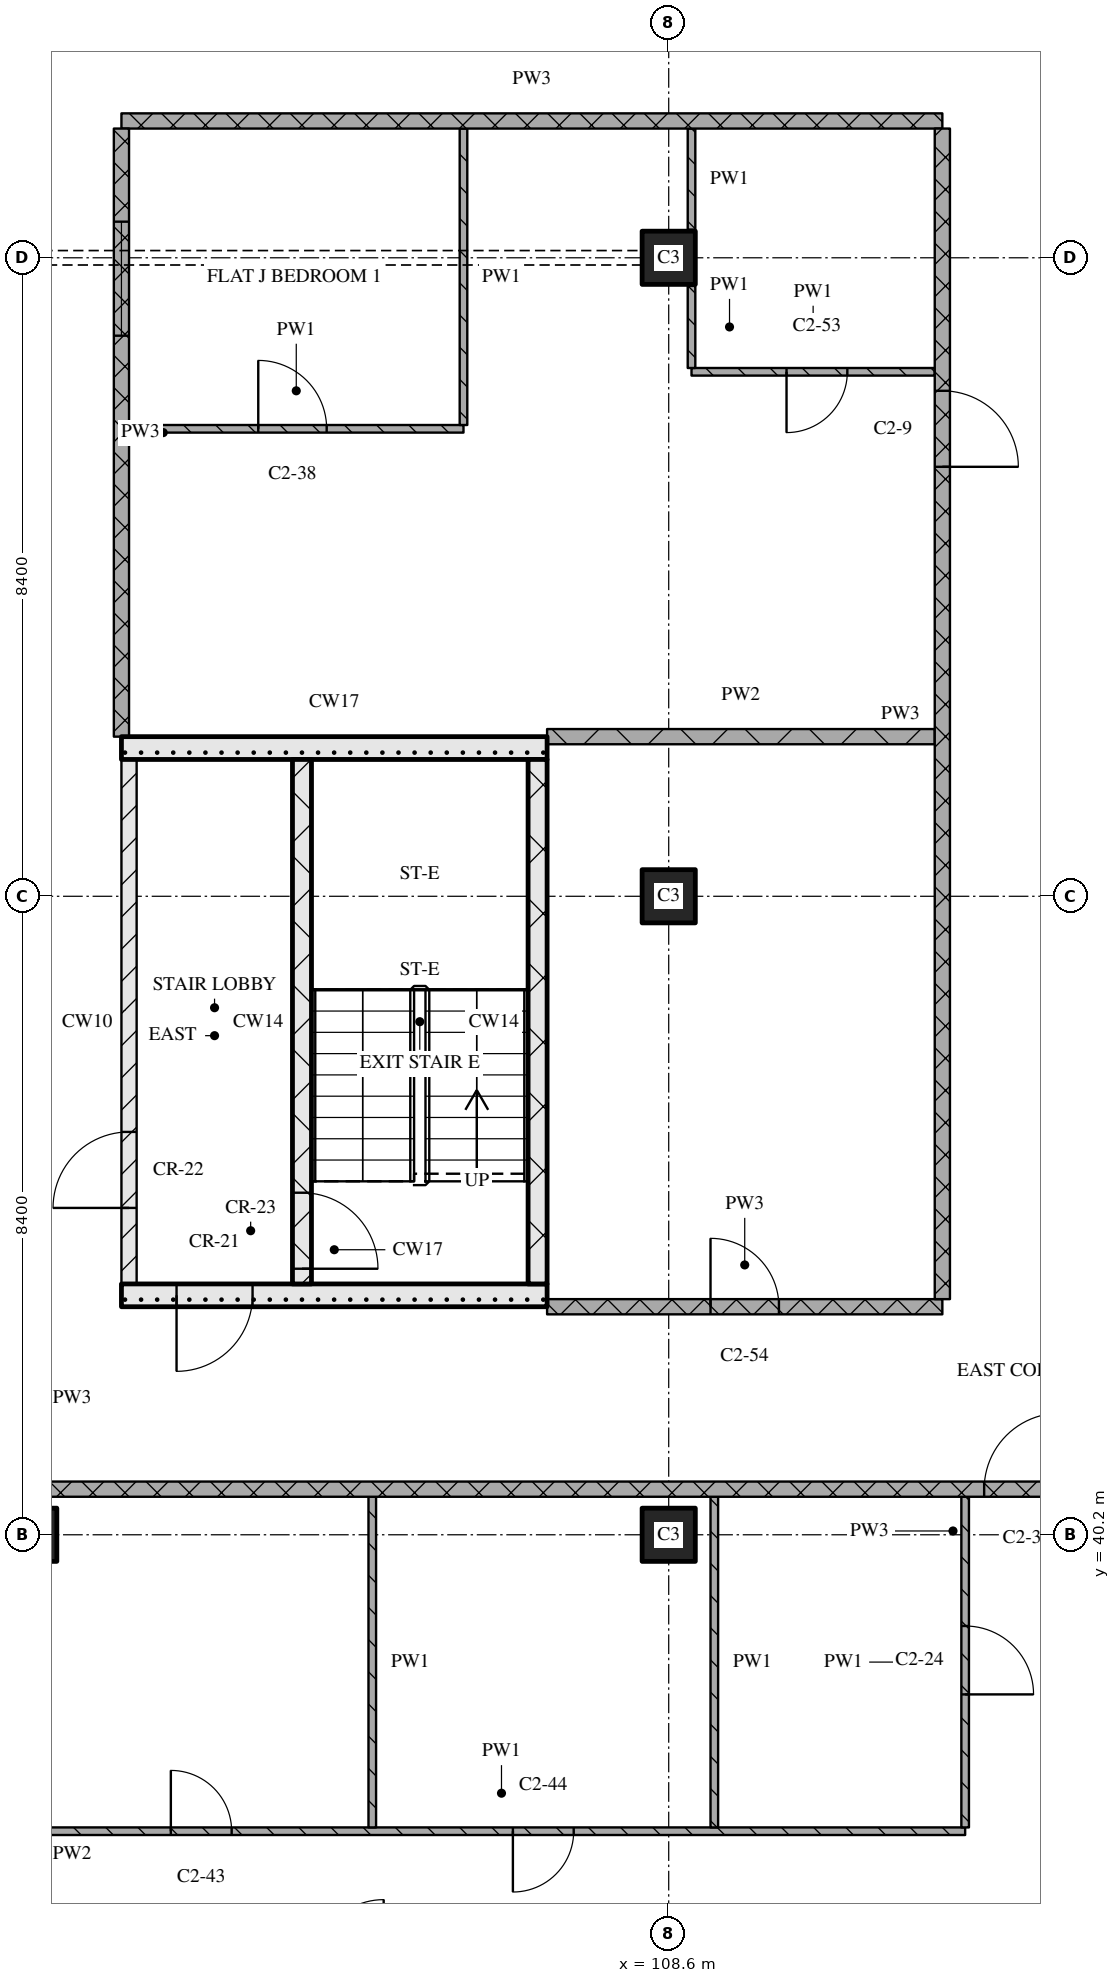
"""IFC4 building model, lengths in metres.
Left out: names, types, materials, properties, quantities, classifications, styles, units other than length and angle.
Written with IfcOpenShell. Run it as: python <this file> out.ifc"""

import sys

from ifc_helpers import new_model, si_unit, direction, frame, frame_2d, origin, origin_2d, place, context, subcontext, project, spatial, rectangle, extrude, element, fill, save


model = new_model("IFC4")
c1 = context("Model", 3, precision=1e-05, world=origin(), true_north=direction((0.0, 1.0)))
c2 = subcontext(c1, "Body", "Model", "MODEL_VIEW")
j1 = project(units=[si_unit("LENGTHUNIT", "METRE"), si_unit("PLANEANGLEUNIT", "RADIAN")], contexts=[c1])
p1 = place(None, origin())
s1 = spatial("IfcSite", under=j1, at=p1, CompositionType="ELEMENT")
p2 = place(p1, origin())
s2 = spatial("IfcBuilding", under=s1, at=p2, CompositionType="ELEMENT")
p3 = place(p2, frame((0.0, 0.0, 161.85)))
s3 = spatial("IfcBuildingStorey", under=s2, at=p3, CompositionType="ELEMENT", Elevation=161.85)
for number, where, z_axis, x_axis in (
    (1, (100.2, 40.2, 0.0), (0.0, 0.0, 1.0), (1.0, 0.0, 0.0)),
    (2, (108.6, 40.2, 0.0), (0.0, 0.0, 1.0), (1.0, 0.0, 0.0)),
    (3, (108.6, 48.6, 0.0), (0.0, 0.0, 1.0), (1.0, 0.0, 0.0)),
    (4, (108.6, 57.0, 0.0), (0.0, 0.0, 1.0), (1.0, 0.0, 0.0)),
):
    element("IfcColumn", number, at=place(p3, frame(where, z_axis=z_axis, x_axis=x_axis)), inside=s3, PredefinedType="COLUMN", context=c2, shape_type="SweptSolid", body=[
        extrude(rectangle(XDim=0.7, YDim=0.7, at=origin_2d()), origin(), (0.0, 0.0, 1.0), 3.6),
    ])
p4 = place(p3, frame((101.4, 43.35, 0.0), z_axis=(0.0, 0.0, 1.0), x_axis=(1.0, 0.0, 0.0)))
e5 = element("IfcWall", 5, at=p4, inside=s3, PredefinedType="SOLIDWALL", context=c2, shape_type="SweptSolid", body=[
    extrude(rectangle(XDim=5.6, YDim=0.3, at=frame_2d((2.8, 0.0))), origin(), (0.0, 0.0, 1.0), 3.32),
])
p5 = place(p4, frame((0.725, 0.0, 0.0)))
e6 = element("IfcOpeningElement", 6, at=p5, cuts=e5, PredefinedType="OPENING", context=c2, shape_type="SweptSolid", body=[
    extrude(rectangle(XDim=1.0, YDim=2.1, at=frame_2d((0.5, 1.05))), frame((0.0, 0.16, 0.0), z_axis=(0.0, -1.0, 0.0), x_axis=(1.0, 0.0, 0.0)), (0.0, 0.0, 1.0), 0.32),
])
p6 = place(p3, frame((101.5, 43.5, 0.0), z_axis=(0.0, 0.0, 1.0), x_axis=(0.0, 1.0, 0.0)))
e7 = element("IfcWall", 7, at=p6, inside=s3, PredefinedType="PARTITIONING", context=c2, shape_type="SweptSolid", body=[
    extrude(rectangle(XDim=6.9, YDim=0.2, at=frame_2d((3.45, 0.0))), origin(), (0.0, 0.0, 1.0), 3.32),
])
p7 = place(p6, frame((1.0, 0.0, 0.0)))
e8 = element("IfcOpeningElement", 8, at=p7, cuts=e7, PredefinedType="OPENING", context=c2, shape_type="SweptSolid", body=[
    extrude(rectangle(XDim=1.0, YDim=2.1, at=frame_2d((0.5, 1.05))), frame((0.0, 0.11, 0.0), z_axis=(0.0, -1.0, 0.0), x_axis=(1.0, 0.0, 0.0)), (0.0, 0.0, 1.0), 0.22),
])
p8 = place(p3, frame((103.775, 43.5, 0.0), z_axis=(0.0, 0.0, 1.0), x_axis=(0.0, 1.0, 0.0)))
e9 = element("IfcWall", 9, at=p8, inside=s3, PredefinedType="SOLIDWALL", context=c2, shape_type="SweptSolid", body=[
    extrude(rectangle(XDim=6.9, YDim=0.25, at=frame_2d((3.45, 0.0))), origin(), (0.0, 0.0, 1.0), 3.32),
])
p9 = place(p8, frame((0.2, 0.0, 0.0)))
e10 = element("IfcOpeningElement", 10, at=p9, cuts=e9, PredefinedType="OPENING", context=c2, shape_type="SweptSolid", body=[
    extrude(rectangle(XDim=1.0, YDim=2.1, at=frame_2d((0.5, 1.05))), frame((0.0, 0.135, 0.0), z_axis=(0.0, -1.0, 0.0), x_axis=(1.0, 0.0, 0.0)), (0.0, 0.0, 1.0), 0.27),
])
p10 = place(p3, frame((106.875, 43.5, 0.0), z_axis=(0.0, 0.0, 1.0), x_axis=(0.0, 1.0, 0.0)))
e11 = element("IfcWall", 11, at=p10, inside=s3, PredefinedType="SOLIDWALL", context=c2, shape_type="SweptSolid", body=[
    extrude(rectangle(XDim=6.9, YDim=0.25, at=frame_2d((3.45, 0.0))), origin(), (0.0, 0.0, 1.0), 3.32),
])
p11 = place(p3, frame((101.4, 50.55, 0.0), z_axis=(0.0, 0.0, 1.0), x_axis=(1.0, 0.0, 0.0)))
e12 = element("IfcWall", 12, at=p11, inside=s3, PredefinedType="SOLIDWALL", context=c2, shape_type="SweptSolid", body=[
    extrude(rectangle(XDim=5.6, YDim=0.3, at=frame_2d((2.8, 0.0))), origin(), (0.0, 0.0, 1.0), 3.32),
])
p12 = place(p3, frame((100.3, 36.3, 0.0), z_axis=(0.0, 0.0, 1.0), x_axis=(1.0, 0.0, 0.0)))
e13 = element("IfcWall", 13, at=p12, inside=s3, PredefinedType="PARTITIONING", context=c2, shape_type="SweptSolid", body=[
    extrude(rectangle(XDim=12.2, YDim=0.1, at=frame_2d((6.1, 0.0))), origin(), (0.0, 0.0, 1.0), 3.32),
])
p13 = place(p12, frame((1.75, 0.0, 0.0)))
e14 = element("IfcOpeningElement", 14, at=p13, cuts=e13, PredefinedType="OPENING", context=c2, shape_type="SweptSolid", body=[
    extrude(rectangle(XDim=0.8, YDim=2.1, at=frame_2d((0.4, 1.05))), frame((0.0, 0.06, 0.0), z_axis=(0.0, -1.0, 0.0), x_axis=(1.0, 0.0, 0.0)), (0.0, 0.0, 1.0), 0.12),
])
p14 = place(p12, frame((6.25, 0.0, 0.0)))
e15 = element("IfcOpeningElement", 15, at=p14, cuts=e13, PredefinedType="OPENING", context=c2, shape_type="SweptSolid", body=[
    extrude(rectangle(XDim=0.8, YDim=2.1, at=frame_2d((0.4, 1.05))), frame((0.0, 0.06, 0.0), z_axis=(0.0, -1.0, 0.0), x_axis=(1.0, 0.0, 0.0)), (0.0, 0.0, 1.0), 0.12),
])
p15 = place(p3, frame((124.48, 40.8, 0.0), z_axis=(0.0, 0.0, 1.0), x_axis=(-1.0, 0.0, 0.0)))
e16 = element("IfcWall", 16, at=p15, inside=s3, PredefinedType="PARTITIONING", context=c2, shape_type="SweptSolid", body=[
    extrude(rectangle(XDim=24.28, YDim=0.2, at=frame_2d((12.14, 0.0))), origin(), (0.0, 0.0, 1.0), 3.32),
])
p16 = place(p15, frame((10.73, 0.0, 0.0)))
e17 = element("IfcOpeningElement", 17, at=p16, cuts=e16, PredefinedType="OPENING", context=c2, shape_type="SweptSolid", body=[
    extrude(rectangle(XDim=1.0, YDim=2.1, at=frame_2d((0.5, 1.05))), frame((0.0, 0.11, 0.0), z_axis=(0.0, -1.0, 0.0), x_axis=(1.0, 0.0, 0.0)), (0.0, 0.0, 1.0), 0.22),
])
p17 = place(p3, frame((107.0, 43.2, 0.0), z_axis=(0.0, 0.0, 1.0), x_axis=(1.0, 0.0, 0.0)))
e18 = element("IfcWall", 18, at=p17, inside=s3, PredefinedType="PARTITIONING", context=c2, shape_type="SweptSolid", body=[
    extrude(rectangle(XDim=5.2, YDim=0.2, at=frame_2d((2.6, 0.0))), origin(), (0.0, 0.0, 1.0), 3.32),
])
p18 = place(p17, frame((2.15, 0.0, 0.0)))
e19 = element("IfcOpeningElement", 19, at=p18, cuts=e18, PredefinedType="OPENING", context=c2, shape_type="SweptSolid", body=[
    extrude(rectangle(XDim=0.9, YDim=2.1, at=frame_2d((0.45, 1.05))), frame((0.0, 0.11, 0.0), z_axis=(0.0, -1.0, 0.0), x_axis=(1.0, 0.0, 0.0)), (0.0, 0.0, 1.0), 0.22),
])
p19 = place(p3, frame((107.0, 50.7, 0.0), z_axis=(0.0, 0.0, 1.0), x_axis=(1.0, 0.0, 0.0)))
e20 = element("IfcWall", 20, at=p19, inside=s3, PredefinedType="PARTITIONING", context=c2, shape_type="SweptSolid", body=[
    extrude(rectangle(XDim=5.1, YDim=0.2, at=frame_2d((2.55, 0.0))), origin(), (0.0, 0.0, 1.0), 3.32),
])
p20 = place(p3, frame((101.5, 54.75, 0.0), z_axis=(0.0, 0.0, 1.0), x_axis=(1.0, 0.0, 0.0)))
e21 = element("IfcWall", 21, at=p20, inside=s3, PredefinedType="PARTITIONING", context=c2, shape_type="SweptSolid", body=[
    extrude(rectangle(XDim=4.4, YDim=0.1, at=frame_2d((2.2, 0.0))), origin(), (0.0, 0.0, 1.0), 3.32),
])
p21 = place(p20, frame((1.7, 0.0, 0.0)))
e22 = element("IfcOpeningElement", 22, at=p21, cuts=e21, PredefinedType="OPENING", context=c2, shape_type="SweptSolid", body=[
    extrude(rectangle(XDim=0.9, YDim=2.1, at=frame_2d((0.45, 1.05))), frame((0.0, 0.06, 0.0), z_axis=(0.0, -1.0, 0.0), x_axis=(1.0, 0.0, 0.0)), (0.0, 0.0, 1.0), 0.12),
])
p22 = place(p3, frame((108.9, 55.5, 0.0), z_axis=(0.0, 0.0, 1.0), x_axis=(1.0, 0.0, 0.0)))
e23 = element("IfcWall", 23, at=p22, inside=s3, PredefinedType="PARTITIONING", context=c2, shape_type="SweptSolid", body=[
    extrude(rectangle(XDim=3.2, YDim=0.1, at=frame_2d((1.6, 0.0))), origin(), (0.0, 0.0, 1.0), 3.32),
])
p23 = place(p22, frame((1.25, 0.0, 0.0)))
e24 = element("IfcOpeningElement", 24, at=p23, cuts=e23, PredefinedType="OPENING", context=c2, shape_type="SweptSolid", body=[
    extrude(rectangle(XDim=0.8, YDim=2.1, at=frame_2d((0.4, 1.05))), frame((0.0, 0.06, 0.0), z_axis=(0.0, -1.0, 0.0), x_axis=(1.0, 0.0, 0.0)), (0.0, 0.0, 1.0), 0.12),
])
p24 = place(p3, frame((101.4, 58.8, 0.0), z_axis=(0.0, 0.0, 1.0), x_axis=(1.0, 0.0, 0.0)))
e25 = element("IfcWall", 25, at=p24, inside=s3, PredefinedType="PARTITIONING", context=c2, shape_type="SweptSolid", body=[
    extrude(rectangle(XDim=10.8, YDim=0.2, at=frame_2d((5.4, 0.0))), origin(), (0.0, 0.0, 1.0), 3.32),
])
p25 = place(p3, frame((101.4, 58.7, 0.0), z_axis=(0.0, 0.0, 1.0), x_axis=(0.0, -1.0, 0.0)))
e26 = element("IfcWall", 26, at=p25, inside=s3, PredefinedType="PARTITIONING", context=c2, shape_type="SweptSolid", body=[
    extrude(rectangle(XDim=8.0, YDim=0.2, at=frame_2d((4.0, 0.0))), origin(), (0.0, 0.0, 1.0), 3.32),
])
p26 = place(p25, frame((1.225, 0.0, 0.9)))
e27 = element("IfcOpeningElement", 27, at=p26, cuts=e26, PredefinedType="OPENING", context=c2, shape_type="SweptSolid", body=[
    extrude(rectangle(XDim=1.5, YDim=1.5, at=frame_2d((0.75, 0.75))), frame((0.0, 0.11, 0.0), z_axis=(0.0, -1.0, 0.0), x_axis=(1.0, 0.0, 0.0)), (0.0, 0.0, 1.0), 0.22),
])
p27 = place(p3, frame((104.7, 40.7, 0.0), z_axis=(0.0, 0.0, 1.0), x_axis=(0.0, -1.0, 0.0)))
e28 = element("IfcWall", 28, at=p27, inside=s3, PredefinedType="PARTITIONING", context=c2, shape_type="SweptSolid", body=[
    extrude(rectangle(XDim=4.35, YDim=0.1, at=frame_2d((2.175, 0.0))), origin(), (0.0, 0.0, 1.0), 3.32),
])
p28 = place(p3, frame((105.9, 58.7, 0.0), z_axis=(0.0, 0.0, 1.0), x_axis=(0.0, -1.0, 0.0)))
e29 = element("IfcWall", 29, at=p28, inside=s3, PredefinedType="PARTITIONING", context=c2, shape_type="SweptSolid", body=[
    extrude(rectangle(XDim=3.9, YDim=0.1, at=frame_2d((1.95, 0.0))), origin(), (0.0, 0.0, 1.0), 3.32),
])
p29 = place(p3, frame((108.9, 56.63, 0.0), z_axis=(0.0, 0.0, 1.0), x_axis=(0.0, -1.0, 0.0)))
e30 = element("IfcWall", 30, at=p29, inside=s3, PredefinedType="PARTITIONING", context=c2, shape_type="SweptSolid", body=[
    extrude(rectangle(XDim=1.08, YDim=0.1, at=frame_2d((0.54, 0.0))), origin(), (0.0, 0.0, 1.0), 3.32),
])
p30 = place(p3, frame((108.9, 58.7, 0.0), z_axis=(0.0, 0.0, 1.0), x_axis=(0.0, -1.0, 0.0)))
e31 = element("IfcWall", 31, at=p30, inside=s3, PredefinedType="PARTITIONING", context=c2, shape_type="SweptSolid", body=[
    extrude(rectangle(XDim=1.33, YDim=0.1, at=frame_2d((0.665, 0.0))), origin(), (0.0, 0.0, 1.0), 3.32),
])
p31 = place(p3, frame((109.2, 40.7, 0.0), z_axis=(0.0, 0.0, 1.0), x_axis=(0.0, -1.0, 0.0)))
e32 = element("IfcWall", 32, at=p31, inside=s3, PredefinedType="PARTITIONING", context=c2, shape_type="SweptSolid", body=[
    extrude(rectangle(XDim=4.35, YDim=0.1, at=frame_2d((2.175, 0.0))), origin(), (0.0, 0.0, 1.0), 3.32),
])
p32 = place(p3, frame((112.2, 43.3, 0.0), z_axis=(0.0, 0.0, 1.0), x_axis=(0.0, 1.0, 0.0)))
e33 = element("IfcWall", 33, at=p32, inside=s3, PredefinedType="PARTITIONING", context=c2, shape_type="SweptSolid", body=[
    extrude(rectangle(XDim=15.4, YDim=0.2, at=frame_2d((7.7, 0.0))), origin(), (0.0, 0.0, 1.0), 3.32),
])
p33 = place(p32, frame((10.95, 0.0, 0.0)))
e34 = element("IfcOpeningElement", 34, at=p33, cuts=e33, PredefinedType="OPENING", context=c2, shape_type="SweptSolid", body=[
    extrude(rectangle(XDim=1.0, YDim=2.1, at=frame_2d((0.5, 1.05))), frame((0.0, 0.11, 0.0), z_axis=(0.0, -1.0, 0.0), x_axis=(1.0, 0.0, 0.0)), (0.0, 0.0, 1.0), 0.22),
])
p34 = place(p3, frame((112.5, 36.35, 0.0), z_axis=(0.0, 0.0, 1.0), x_axis=(0.0, 1.0, 0.0)))
e35 = element("IfcWall", 35, at=p34, inside=s3, PredefinedType="PARTITIONING", context=c2, shape_type="SweptSolid", body=[
    extrude(rectangle(XDim=4.35, YDim=0.1, at=frame_2d((2.175, 0.0))), origin(), (0.0, 0.0, 1.0), 3.32),
])
p35 = place(p34, frame((1.75, 0.0, 0.0)))
e36 = element("IfcOpeningElement", 36, at=p35, cuts=e35, PredefinedType="OPENING", context=c2, shape_type="SweptSolid", body=[
    extrude(rectangle(XDim=0.9, YDim=2.1, at=frame_2d((0.45, 1.05))), frame((0.0, 0.06, 0.0), z_axis=(0.0, -1.0, 0.0), x_axis=(1.0, 0.0, 0.0)), (0.0, 0.0, 1.0), 0.12),
])
p36 = place(p5, origin())
e37 = element("IfcDoor", 37, at=p36, inside=s3, OperationType="SINGLE_SWING_RIGHT", PredefinedType="DOOR", context=c2, shape_type="SweptSolid", body=[
    extrude(rectangle(XDim=1.0, YDim=2.1, at=frame_2d((0.5, 1.05))), frame((0.0, 0.025, 0.0), z_axis=(0.0, -1.0, 0.0), x_axis=(1.0, 0.0, 0.0)), (0.0, 0.0, 1.0), 0.05),
])
fill(e6, e37)
p37 = place(p9, origin())
e38 = element("IfcDoor", 38, at=p37, inside=s3, OperationType="SINGLE_SWING_RIGHT", PredefinedType="DOOR", context=c2, shape_type="SweptSolid", body=[
    extrude(rectangle(XDim=1.0, YDim=2.1, at=frame_2d((0.5, 1.05))), frame((0.0, 0.025, 0.0), z_axis=(0.0, -1.0, 0.0), x_axis=(1.0, 0.0, 0.0)), (0.0, 0.0, 1.0), 0.05),
])
fill(e10, e38)
p38 = place(p7, origin())
e39 = element("IfcDoor", 39, at=p38, inside=s3, OperationType="SINGLE_SWING_LEFT", PredefinedType="DOOR", context=c2, shape_type="SweptSolid", body=[
    extrude(rectangle(XDim=1.0, YDim=2.1, at=frame_2d((0.5, 1.05))), frame((0.0, 0.025, 0.0), z_axis=(0.0, -1.0, 0.0), x_axis=(1.0, 0.0, 0.0)), (0.0, 0.0, 1.0), 0.05),
])
fill(e8, e39)
p39 = place(p13, origin())
e40 = element("IfcDoor", 40, at=p39, inside=s3, OperationType="SINGLE_SWING_LEFT", PredefinedType="DOOR", context=c2, shape_type="SweptSolid", body=[
    extrude(rectangle(XDim=0.8, YDim=2.1, at=frame_2d((0.4, 1.05))), frame((0.0, 0.025, 0.0), z_axis=(0.0, -1.0, 0.0), x_axis=(1.0, 0.0, 0.0)), (0.0, 0.0, 1.0), 0.05),
])
fill(e14, e40)
p40 = place(p14, origin())
e41 = element("IfcDoor", 41, at=p40, inside=s3, OperationType="SINGLE_SWING_RIGHT", PredefinedType="DOOR", context=c2, shape_type="SweptSolid", body=[
    extrude(rectangle(XDim=0.8, YDim=2.1, at=frame_2d((0.4, 1.05))), frame((0.0, 0.025, 0.0), z_axis=(0.0, -1.0, 0.0), x_axis=(1.0, 0.0, 0.0)), (0.0, 0.0, 1.0), 0.05),
])
fill(e15, e41)
p41 = place(p16, origin())
e42 = element("IfcDoor", 42, at=p41, inside=s3, OperationType="SINGLE_SWING_RIGHT", PredefinedType="DOOR", context=c2, shape_type="SweptSolid", body=[
    extrude(rectangle(XDim=1.0, YDim=2.1, at=frame_2d((0.5, 1.05))), frame((0.0, 0.025, 0.0), z_axis=(0.0, -1.0, 0.0), x_axis=(1.0, 0.0, 0.0)), (0.0, 0.0, 1.0), 0.05),
])
fill(e17, e42)
p42 = place(p18, origin())
e43 = element("IfcDoor", 43, at=p42, inside=s3, OperationType="SINGLE_SWING_LEFT", PredefinedType="DOOR", context=c2, shape_type="SweptSolid", body=[
    extrude(rectangle(XDim=0.9, YDim=2.1, at=frame_2d((0.45, 1.05))), frame((0.0, 0.025, 0.0), z_axis=(0.0, -1.0, 0.0), x_axis=(1.0, 0.0, 0.0)), (0.0, 0.0, 1.0), 0.05),
])
fill(e19, e43)
p43 = place(p21, origin())
e44 = element("IfcDoor", 44, at=p43, inside=s3, OperationType="SINGLE_SWING_LEFT", PredefinedType="DOOR", context=c2, shape_type="SweptSolid", body=[
    extrude(rectangle(XDim=0.9, YDim=2.1, at=frame_2d((0.45, 1.05))), frame((0.0, 0.025, 0.0), z_axis=(0.0, -1.0, 0.0), x_axis=(1.0, 0.0, 0.0)), (0.0, 0.0, 1.0), 0.05),
])
fill(e22, e44)
p44 = place(p23, origin())
e45 = element("IfcDoor", 45, at=p44, inside=s3, OperationType="SINGLE_SWING_RIGHT", PredefinedType="DOOR", context=c2, shape_type="SweptSolid", body=[
    extrude(rectangle(XDim=0.8, YDim=2.1, at=frame_2d((0.4, 1.05))), frame((0.0, 0.025, 0.0), z_axis=(0.0, -1.0, 0.0), x_axis=(1.0, 0.0, 0.0)), (0.0, 0.0, 1.0), 0.05),
])
fill(e24, e45)
p45 = place(p33, origin())
e46 = element("IfcDoor", 46, at=p45, inside=s3, OperationType="SINGLE_SWING_RIGHT", PredefinedType="DOOR", context=c2, shape_type="SweptSolid", body=[
    extrude(rectangle(XDim=1.0, YDim=2.1, at=frame_2d((0.5, 1.05))), frame((0.0, 0.025, 0.0), z_axis=(0.0, -1.0, 0.0), x_axis=(1.0, 0.0, 0.0)), (0.0, 0.0, 1.0), 0.05),
])
fill(e34, e46)
p46 = place(p35, origin())
e47 = element("IfcDoor", 47, at=p46, inside=s3, OperationType="SINGLE_SWING_RIGHT", PredefinedType="DOOR", context=c2, shape_type="SweptSolid", body=[
    extrude(rectangle(XDim=0.9, YDim=2.1, at=frame_2d((0.45, 1.05))), frame((0.0, 0.025, 0.0), z_axis=(0.0, -1.0, 0.0), x_axis=(1.0, 0.0, 0.0)), (0.0, 0.0, 1.0), 0.05),
])
fill(e36, e47)
p47 = place(p26, origin())
e48 = element("IfcWindow", 48, at=p47, inside=s3, PartitioningType="SINGLE_PANEL", PredefinedType="WINDOW", context=c2, shape_type="SweptSolid", body=[
    extrude(rectangle(XDim=1.5, YDim=1.5, at=frame_2d((0.75, 0.75))), frame((0.0, 0.03, 0.0), z_axis=(0.0, -1.0, 0.0), x_axis=(1.0, 0.0, 0.0)), (0.0, 0.0, 1.0), 0.06),
])
fill(e27, e48)
save(model, sys.argv[1])
